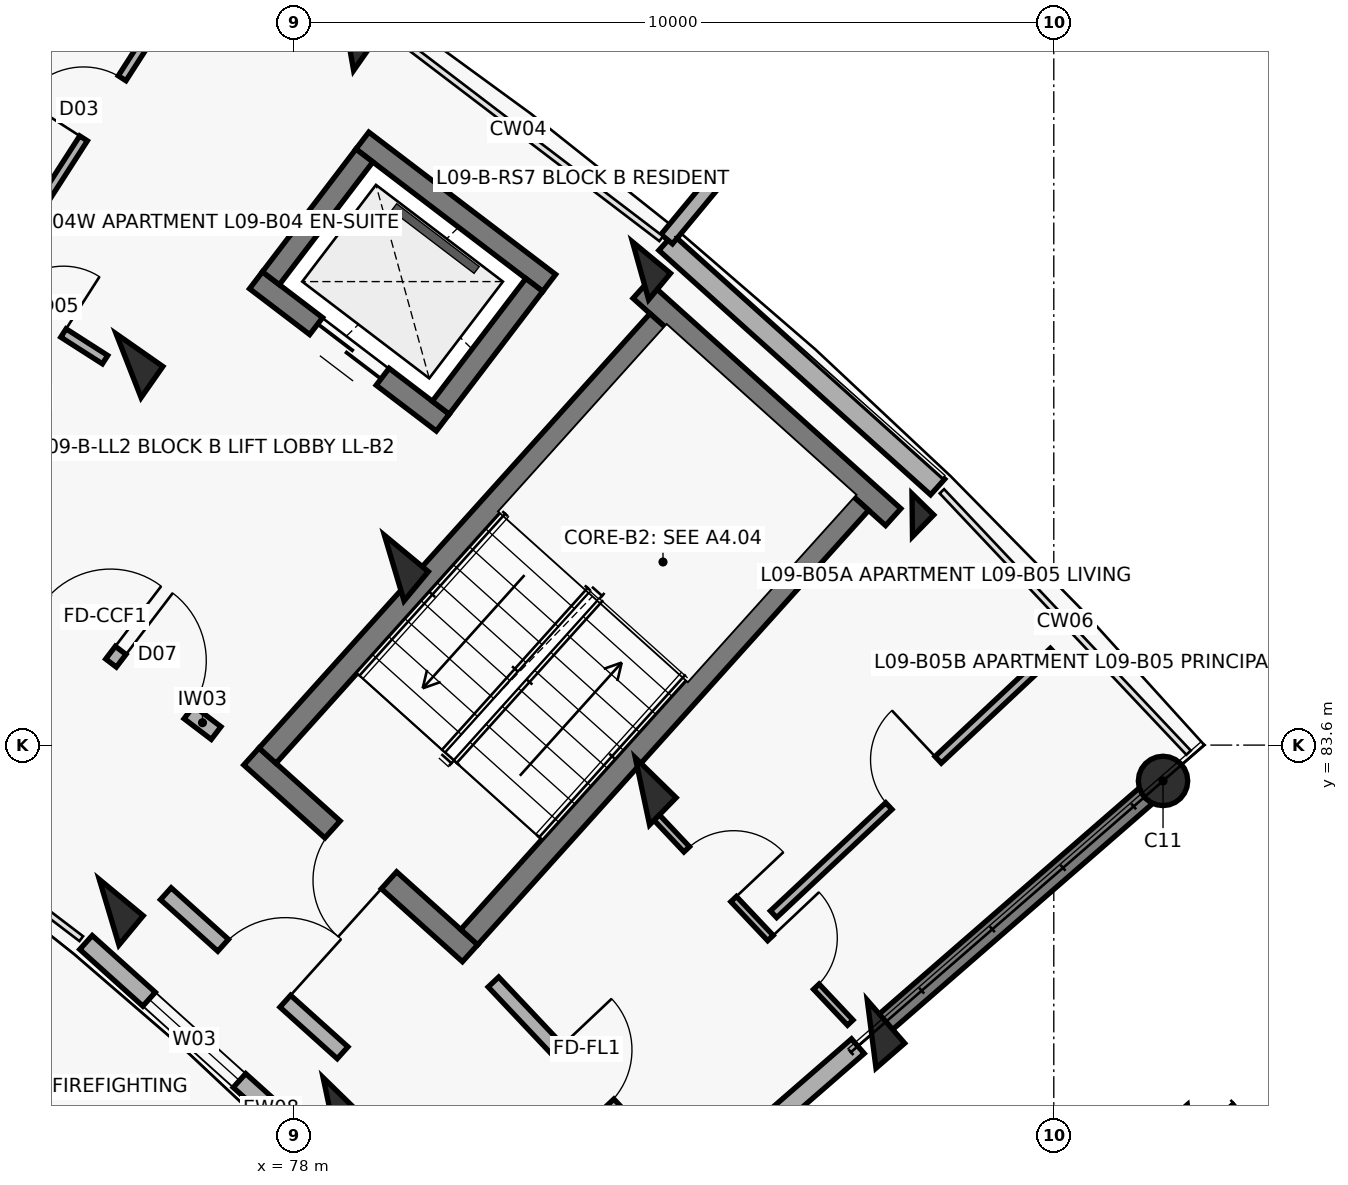
"""IFC4 building model, lengths in metres.
Left out: names, types, materials, properties, quantities, classifications, styles, units other than length and angle.
Written with IfcOpenShell. Run it as: python <this file> out.ifc"""

import sys

from ifc_helpers import new_model, si_unit, direction, frame, frame_2d, origin, origin_2d, place, context, subcontext, project, spatial, rectangle, circle, extrude, element, fill, save


model = new_model("IFC4")
c1 = context("Model", 3, precision=1e-05, world=origin(), true_north=direction((0.0, 1.0)))
c2 = subcontext(c1, "Body", "Model", "MODEL_VIEW")
j1 = project(units=[si_unit("LENGTHUNIT", "METRE"), si_unit("PLANEANGLEUNIT", "RADIAN")], contexts=[c1])
p1 = place(None, origin())
s1 = spatial("IfcSite", under=j1, at=p1, CompositionType="ELEMENT")
p2 = place(p1, origin())
s2 = spatial("IfcBuilding", under=s1, at=p2, CompositionType="ELEMENT")
p3 = place(p2, frame((0.0, 0.0, 29.8)))
s3 = spatial("IfcBuildingStorey", under=s2, at=p3, CompositionType="ELEMENT", Elevation=29.8)
p4 = place(p3, frame((75.828, 88.592, 0.0), z_axis=(0.0, 0.0, 1.0), x_axis=(0.573004420611, 0.819552276527, 0.0)))
e1 = element("IfcColumn", 1, at=p4, inside=s3, PredefinedType="COLUMN", context=c2, shape_type="SweptSolid", body=[
    extrude(rectangle(XDim=0.5, YDim=0.75, at=origin_2d()), origin(), (0.0, 0.0, 1.0), 3.1),
])
p5 = place(p3, frame((78.739, 92.755, 0.0), z_axis=(0.0, 0.0, 1.0), x_axis=(0.573004420611, 0.819552276527, 0.0)))
e2 = element("IfcColumn", 2, at=p5, inside=s3, PredefinedType="COLUMN", context=c2, shape_type="SweptSolid", body=[
    extrude(rectangle(XDim=0.4, YDim=0.4, at=origin_2d()), origin(), (0.0, 0.0, 1.0), 3.1),
])
for number, where, z_axis, x_axis in (
    (3, (75.571, 81.402, 0.0), (0.0, 0.0, 1.0), (0.638, 0.77, 0.0)),
    (4, (79.322, 85.93, 0.0), (0.0, 0.0, 1.0), (0.638, 0.77, 0.0)),
):
    element("IfcColumn", number, at=place(p3, frame(where, z_axis=z_axis, x_axis=x_axis)), inside=s3, PredefinedType="COLUMN", context=c2, shape_type="SweptSolid", body=[
        extrude(rectangle(XDim=0.5, YDim=0.75, at=origin_2d()), origin(), (0.0, 0.0, 1.0), 3.1),
    ])
p6 = place(p3, frame((82.563, 89.842, 0.0), z_axis=(0.0, 0.0, 1.0), x_axis=(0.637961754089, 0.770068049148, 0.0)))
e5 = element("IfcColumn", 5, at=p6, inside=s3, PredefinedType="COLUMN", context=c2, shape_type="SweptSolid", body=[
    extrude(rectangle(XDim=0.45, YDim=0.65, at=origin_2d()), origin(), (0.0, 0.0, 1.0), 3.1),
])
for number, where, z_axis, x_axis in (
    (6, (78.48, 78.784, 0.0), (0.0, 0.0, 1.0), (0.699, 0.715, 0.0)),
    (7, (82.588, 82.991, 0.0), (0.0, 0.0, 1.0), (0.699, 0.715, 0.0)),
):
    element("IfcColumn", number, at=place(p3, frame(where, z_axis=z_axis, x_axis=x_axis)), inside=s3, PredefinedType="COLUMN", context=c2, shape_type="SweptSolid", body=[
        extrude(rectangle(XDim=0.5, YDim=0.75, at=origin_2d()), origin(), (0.0, 0.0, 1.0), 3.1),
    ])
p7 = place(p3, frame((86.137, 86.626, 0.0), z_axis=(0.0, 0.0, 1.0), x_axis=(0.698665066769, 0.715448897181, 0.0)))
e8 = element("IfcColumn", 8, at=p7, inside=s3, PredefinedType="COLUMN", context=c2, shape_type="SweptSolid", body=[
    extrude(rectangle(XDim=0.4, YDim=0.4, at=origin_2d()), origin(), (0.0, 0.0, 1.0), 3.1),
])
p8 = place(p3, frame((85.603, 79.796, 0.0), z_axis=(0.0, 0.0, 1.0), x_axis=(0.754709580223, 0.656059028991, 0.0)))
e9 = element("IfcColumn", 9, at=p8, inside=s3, PredefinedType="COLUMN", context=c2, shape_type="SweptSolid", body=[
    extrude(rectangle(XDim=0.5, YDim=0.75, at=origin_2d()), origin(), (0.0, 0.0, 1.0), 3.1),
])
p9 = place(p3, frame((89.437, 83.129, 0.0), z_axis=(0.0, 0.0, 1.0), x_axis=(0.754709580223, 0.656059028991, 0.0)))
e10 = element("IfcColumn", 10, at=p9, inside=s3, PredefinedType="COLUMN", context=c2, shape_type="SweptSolid", body=[
    extrude(circle(Radius=0.325, at=origin_2d()), origin(), (0.0, 0.0, 1.0), 3.1),
])
p10 = place(p3, frame((85.739, 79.914, 0.0), z_axis=(0.0, 0.0, 1.0), x_axis=(0.754703505217, 0.65606601742, 0.0)))
e11 = element("IfcWall", 11, at=p10, inside=s3, PredefinedType="SHEAR", context=c2, shape_type="SweptSolid", body=[
    extrude(rectangle(XDim=4.72, YDim=0.27, at=frame_2d((2.36, 0.0))), origin(), (0.0, 0.0, 1.0), 2.86),
])
p11 = place(p3, frame((89.814, 78.422, 0.0), z_axis=(0.0, 0.0, 1.0), x_axis=(-0.754709580223, -0.656059028991, 0.0)))
e12 = element("IfcColumn", 12, at=p11, inside=s3, PredefinedType="COLUMN", context=c2, shape_type="SweptSolid", body=[
    extrude(rectangle(XDim=0.5, YDim=0.75, at=origin_2d()), origin(), (0.0, 0.0, 1.0), 3.1),
])
p12 = place(p3, frame((82.897, 90.213, 0.0), z_axis=(0.0, 0.0, 1.0), x_axis=(0.743387539862, -0.668860946369, 0.0)))
e13 = element("IfcWall", 13, at=p12, inside=s3, PredefinedType="SOLIDWALL", context=c2, shape_type="SweptSolid", body=[
    extrude(rectangle(XDim=4.809, YDim=0.278, at=frame_2d((2.405, 0.0))), origin(), (0.0, 0.0, 1.0), 2.25),
])
p13 = place(p3, frame((82.908, 90.257, 0.0), z_axis=(0.0, 0.0, 1.0), x_axis=(0.637967316825, 0.770063440674, 0.0)))
e14 = element("IfcWall", 14, at=p13, inside=s3, PredefinedType="PARAPET", context=c2, shape_type="SweptSolid", body=[
    extrude(rectangle(XDim=0.9, YDim=0.195, at=frame_2d((0.45, 0.0))), origin(), (0.0, 0.0, 1.0), 2.25),
])
p14 = place(p3, frame((75.267, 81.003, 0.0), z_axis=(0.0, 0.0, 1.0), x_axis=(0.743363835609, -0.668887290886, 0.0)))
e15 = element("IfcWall", 15, at=p14, inside=s3, PredefinedType="SOLIDWALL", context=c2, shape_type="SweptSolid", body=[
    extrude(rectangle(XDim=3.832, YDim=0.245, at=frame_2d((1.916, 0.0))), origin(), (0.0, 0.0, 1.0), 2.25),
])
p15 = place(p14, frame((1.116, 0.0, 0.32)))
e16 = element("IfcOpeningElement", 16, at=p15, cuts=e15, PredefinedType="OPENING", context=c2, shape_type="SweptSolid", body=[
    extrude(rectangle(XDim=1.6, YDim=1.5, at=frame_2d((0.8, 0.75))), frame((0.0, 0.133, 0.0), z_axis=(0.0, -1.0, 0.0), x_axis=(1.0, 0.0, 0.0)), (0.0, 0.0, 1.0), 0.265),
])
p16 = place(p3, frame((81.347, 76.096, 0.0), z_axis=(0.0, 0.0, 1.0), x_axis=(0.754709658894, 0.65605893849, 0.0)))
e17 = element("IfcWall", 17, at=p16, inside=s3, PredefinedType="SOLIDWALL", context=c2, shape_type="SweptSolid", body=[
    extrude(rectangle(XDim=5.4, YDim=0.255, at=frame_2d((2.7, 0.0))), origin(), (0.0, 0.0, 1.0), 2.18),
])
p17 = place(p16, frame((0.79, 0.0, 0.75)))
e18 = element("IfcOpeningElement", 18, at=p17, cuts=e17, PredefinedType="OPENING", context=c2, shape_type="SweptSolid", body=[
    extrude(rectangle(XDim=1.35, YDim=1.35, at=frame_2d((0.675, 0.675))), frame((0.0, 0.137, 0.0), z_axis=(0.0, -1.0, 0.0), x_axis=(1.0, 0.0, 0.0)), (0.0, 0.0, 1.0), 0.275),
])
p18 = place(p3, frame((71.979, 79.915, 0.0), z_axis=(0.0, 0.0, 1.0), x_axis=(0.729564048979, -0.68391249326, 0.0)))
e19 = element("IfcWall", 19, at=p18, inside=s3, PredefinedType="PARAPET", context=c2, shape_type="SweptSolid", body=[
    extrude(rectangle(XDim=9.075, YDim=0.18, at=frame_2d((4.538, 0.0))), origin(), (0.0, 0.0, 1.0), 0.25),
])
p19 = place(p3, frame((80.32, 80.862, 0.0), z_axis=(0.0, 0.0, 1.0), x_axis=(-0.743375696158, 0.668874109501, 0.0)))
e20 = element("IfcWall", 20, at=p19, inside=s3, PredefinedType="SHEAR", context=c2, shape_type="SweptSolid", body=[
    extrude(rectangle(XDim=3.87, YDim=0.3, at=frame_2d((1.935, 0.0))), origin(), (0.0, 0.0, 1.0), 3.1),
])
p20 = place(p19, frame((1.435, 0.0, 0.0)))
e21 = element("IfcOpeningElement", 21, at=p20, cuts=e20, PredefinedType="OPENING", context=c2, shape_type="SweptSolid", body=[
    extrude(rectangle(XDim=1.0, YDim=2.15, at=frame_2d((0.5, 1.075))), frame((0.0, 0.16, 0.0), z_axis=(0.0, -1.0, 0.0), x_axis=(1.0, 0.0, 0.0)), (0.0, 0.0, 1.0), 0.32),
])
p21 = place(p3, frame((85.887, 86.601, 0.0), z_axis=(0.0, 0.0, 1.0), x_axis=(-0.743400052815, 0.668847038922, 0.0)))
e22 = element("IfcWall", 22, at=p21, inside=s3, PredefinedType="SHEAR", context=c2, shape_type="SweptSolid", body=[
    extrude(rectangle(XDim=4.47, YDim=0.3, at=frame_2d((2.235, 0.0))), origin(), (0.0, 0.0, 1.0), 3.1),
])
p22 = place(p3, frame((80.309, 81.073, 0.0), z_axis=(0.0, 0.0, 1.0), x_axis=(0.668885797871, 0.743365179038, 0.0)))
e23 = element("IfcWall", 23, at=p22, inside=s3, PredefinedType="SHEAR", context=c2, shape_type="SweptSolid", body=[
    extrude(rectangle(XDim=7.69, YDim=0.3, at=frame_2d((3.845, 0.0))), origin(), (0.0, 0.0, 1.0), 3.1),
])
p23 = place(p3, frame((77.655, 83.461, 0.0), z_axis=(0.0, 0.0, 1.0), x_axis=(0.668868253964, 0.743380964808, 0.0)))
e24 = element("IfcWall", 24, at=p23, inside=s3, PredefinedType="SHEAR", context=c2, shape_type="SweptSolid", body=[
    extrude(rectangle(XDim=7.69, YDim=0.3, at=frame_2d((3.845, 0.0))), origin(), (0.0, 0.0, 1.0), 3.1),
])
p24 = place(p3, frame((79.961, 87.844, 0.0), z_axis=(0.0, 0.0, 1.0), x_axis=(-0.795464365424, 0.606000365793, 0.0)))
e25 = element("IfcWall", 25, at=p24, inside=s3, PredefinedType="SHEAR", context=c2, shape_type="SweptSolid", body=[
    extrude(rectangle(XDim=3.09, YDim=0.28, at=frame_2d((1.545, 0.0))), origin(), (0.0, 0.0, 1.0), 3.1),
])
p25 = place(p24, frame((0.995, 0.0, 0.0)))
e26 = element("IfcOpeningElement", 26, at=p25, cuts=e25, PredefinedType="OPENING", context=c2, shape_type="SweptSolid", body=[
    extrude(rectangle(XDim=1.1, YDim=2.15, at=frame_2d((0.55, 1.075))), frame((0.0, 0.15, 0.0), z_axis=(0.0, -1.0, 0.0), x_axis=(1.0, 0.0, 0.0)), (0.0, 0.0, 1.0), 0.3),
])
p26 = place(p3, frame((81.361, 89.681, 0.0), z_axis=(0.0, 0.0, 1.0), x_axis=(-0.795502452183, 0.605950368076, 0.0)))
e27 = element("IfcWall", 27, at=p26, inside=s3, PredefinedType="SHEAR", context=c2, shape_type="SweptSolid", body=[
    extrude(rectangle(XDim=3.09, YDim=0.28, at=frame_2d((1.545, 0.0))), origin(), (0.0, 0.0, 1.0), 3.1),
])
for number, where, z_axis, x_axis in (
    (28, (79.935, 88.04, 0.0), (0.0, 0.0, 1.0), (0.606, 0.795, 0.0)),
    (29, (77.699, 89.743, 0.0), (0.0, 0.0, 1.0), (0.606, 0.795, 0.0)),
):
    element("IfcWall", number, at=place(p3, frame(where, z_axis=z_axis, x_axis=x_axis)), inside=s3, PredefinedType="SHEAR", context=c2, shape_type="SweptSolid", body=[
        extrude(rectangle(XDim=2.03, YDim=0.28, at=frame_2d((1.015, 0.0))), origin(), (0.0, 0.0, 1.0), 3.1),
    ])
p27 = place(p3, frame((72.33, 90.712, 0.0), z_axis=(0.0, 0.0, 1.0), x_axis=(0.842245628842, -0.539093962771, 0.0)))
e30 = element("IfcWall", 30, at=p27, inside=s3, PredefinedType="PARTITIONING", context=c2, shape_type="SweptSolid", body=[
    extrude(rectangle(XDim=3.785, YDim=0.13, at=frame_2d((1.893, 0.0))), origin(), (0.0, 0.0, 1.0), 2.08),
])
p28 = place(p27, frame((0.65, 0.0, 0.0)))
e31 = element("IfcOpeningElement", 31, at=p28, cuts=e30, PredefinedType="OPENING", context=c2, shape_type="SweptSolid", body=[
    extrude(rectangle(XDim=0.9, YDim=2.1, at=frame_2d((0.45, 1.05))), frame((0.0, 0.075, 0.0), z_axis=(0.0, -1.0, 0.0), x_axis=(1.0, 0.0, 0.0)), (0.0, 0.0, 1.0), 0.15),
])
p29 = place(p27, frame((2.255, 0.0, 0.0)))
e32 = element("IfcOpeningElement", 32, at=p29, cuts=e30, PredefinedType="OPENING", context=c2, shape_type="SweptSolid", body=[
    extrude(rectangle(XDim=0.88, YDim=2.1, at=frame_2d((0.44, 1.05))), frame((0.0, 0.075, 0.0), z_axis=(0.0, -1.0, 0.0), x_axis=(1.0, 0.0, 0.0)), (0.0, 0.0, 1.0), 0.15),
])
p30 = place(p3, frame((74.124, 89.854, 0.0), z_axis=(0.0, 0.0, 1.0), x_axis=(0.5403494769, 0.84144069477, 0.0)))
e33 = element("IfcWall", 33, at=p30, inside=s3, PredefinedType="PARTITIONING", context=c2, shape_type="SweptSolid", body=[
    extrude(rectangle(XDim=5.05, YDim=0.12, at=frame_2d((2.525, 0.0))), origin(), (0.0, 0.0, 1.0), 2.08),
])
p31 = place(p30, frame((2.055, 0.0, 0.0)))
e34 = element("IfcOpeningElement", 34, at=p31, cuts=e33, PredefinedType="OPENING", context=c2, shape_type="SweptSolid", body=[
    extrude(rectangle(XDim=0.94, YDim=2.1, at=frame_2d((0.47, 1.05))), frame((0.0, 0.07, 0.0), z_axis=(0.0, -1.0, 0.0), x_axis=(1.0, 0.0, 0.0)), (0.0, 0.0, 1.0), 0.14),
])
p32 = place(p3, frame((74.357, 85.756, 0.0), z_axis=(0.0, 0.0, 1.0), x_axis=(0.795498026433, -0.605956178235, 0.0)))
e35 = element("IfcWall", 35, at=p32, inside=s3, PredefinedType="SOLIDWALL", context=c2, shape_type="SweptSolid", body=[
    extrude(rectangle(XDim=3.296, YDim=0.21, at=frame_2d((1.648, 0.0))), origin(), (0.0, 0.0, 1.0), 2.08),
])
p33 = place(p32, frame((0.45, 0.0, 0.0)))
e36 = element("IfcOpeningElement", 36, at=p33, cuts=e35, PredefinedType="OPENING", context=c2, shape_type="SweptSolid", body=[
    extrude(rectangle(XDim=1.1, YDim=2.15, at=frame_2d((0.55, 1.075))), frame((0.0, 0.115, 0.0), z_axis=(0.0, -1.0, 0.0), x_axis=(1.0, 0.0, 0.0)), (0.0, 0.0, 1.0), 0.23),
])
p34 = place(p32, frame((1.726, 0.0, 0.0)))
e37 = element("IfcOpeningElement", 37, at=p34, cuts=e35, PredefinedType="OPENING", context=c2, shape_type="SweptSolid", body=[
    extrude(rectangle(XDim=1.12, YDim=2.15, at=frame_2d((0.56, 1.075))), frame((0.0, 0.115, 0.0), z_axis=(0.0, -1.0, 0.0), x_axis=(1.0, 0.0, 0.0)), (0.0, 0.0, 1.0), 0.23),
])
p35 = place(p3, frame((76.317, 81.644, 0.0), z_axis=(0.0, 0.0, 1.0), x_axis=(0.743387266925, -0.668861249718, 0.0)))
e38 = element("IfcWall", 38, at=p35, inside=s3, PredefinedType="SOLIDWALL", context=c2, shape_type="SweptSolid", body=[
    extrude(rectangle(XDim=3.128, YDim=0.21, at=frame_2d((1.564, 0.0))), origin(), (0.0, 0.0, 1.0), 2.08),
])
p36 = place(p35, frame((1.014, 0.0, 0.0)))
e39 = element("IfcOpeningElement", 39, at=p36, cuts=e38, PredefinedType="OPENING", context=c2, shape_type="SweptSolid", body=[
    extrude(rectangle(XDim=1.1, YDim=2.15, at=frame_2d((0.55, 1.075))), frame((0.0, 0.115, 0.0), z_axis=(0.0, -1.0, 0.0), x_axis=(1.0, 0.0, 0.0)), (0.0, 0.0, 1.0), 0.23),
])
p37 = place(p3, frame((80.628, 80.483, 0.0), z_axis=(0.0, 0.0, 1.0), x_axis=(0.686310507227, -0.727308660522, 0.0)))
e40 = element("IfcWall", 40, at=p37, inside=s3, PredefinedType="SOLIDWALL", context=c2, shape_type="SweptSolid", body=[
    extrude(rectangle(XDim=3.436, YDim=0.19, at=frame_2d((1.718, 0.0))), origin(), (0.0, 0.0, 1.0), 2.08),
])
p38 = place(p37, frame((1.228, 0.0, 0.0)))
e41 = element("IfcOpeningElement", 41, at=p38, cuts=e40, PredefinedType="OPENING", context=c2, shape_type="SweptSolid", body=[
    extrude(rectangle(XDim=0.98, YDim=2.15, at=frame_2d((0.49, 1.075))), frame((0.0, 0.105, 0.0), z_axis=(0.0, -1.0, 0.0), x_axis=(1.0, 0.0, 0.0)), (0.0, 0.0, 1.0), 0.21),
])
p39 = place(p3, frame((82.724, 82.701, 0.0), z_axis=(0.0, 0.0, 1.0), x_axis=(0.686331812627, -0.72728855551, 0.0)))
e42 = element("IfcWall", 42, at=p39, inside=s3, PredefinedType="PARTITIONING", context=c2, shape_type="SweptSolid", body=[
    extrude(rectangle(XDim=3.785, YDim=0.1, at=frame_2d((1.893, 0.0))), origin(), (0.0, 0.0, 1.0), 2.08),
])
p40 = place(p39, frame((0.65, 0.0, 0.0)))
e43 = element("IfcOpeningElement", 43, at=p40, cuts=e42, PredefinedType="OPENING", context=c2, shape_type="SweptSolid", body=[
    extrude(rectangle(XDim=0.9, YDim=2.1, at=frame_2d((0.45, 1.05))), frame((0.0, 0.06, 0.0), z_axis=(0.0, -1.0, 0.0), x_axis=(1.0, 0.0, 0.0)), (0.0, 0.0, 1.0), 0.12),
])
p41 = place(p39, frame((2.255, 0.0, 0.0)))
e44 = element("IfcOpeningElement", 44, at=p41, cuts=e42, PredefinedType="OPENING", context=c2, shape_type="SweptSolid", body=[
    extrude(rectangle(XDim=0.88, YDim=2.1, at=frame_2d((0.44, 1.05))), frame((0.0, 0.06, 0.0), z_axis=(0.0, -1.0, 0.0), x_axis=(1.0, 0.0, 0.0)), (0.0, 0.0, 1.0), 0.12),
])
p42 = place(p3, frame((84.312, 81.375, 0.0), z_axis=(0.0, 0.0, 1.0), x_axis=(0.72936983679, 0.684119610288, 0.0)))
e45 = element("IfcWall", 45, at=p42, inside=s3, PredefinedType="PARTITIONING", context=c2, shape_type="SweptSolid", body=[
    extrude(rectangle(XDim=5.05, YDim=0.12, at=frame_2d((2.525, 0.0))), origin(), (0.0, 0.0, 1.0), 2.08),
])
p43 = place(p42, frame((2.08, 0.0, 0.0)))
e46 = element("IfcOpeningElement", 46, at=p43, cuts=e45, PredefinedType="OPENING", context=c2, shape_type="SweptSolid", body=[
    extrude(rectangle(XDim=0.89, YDim=2.1, at=frame_2d((0.445, 1.05))), frame((0.0, 0.07, 0.0), z_axis=(0.0, -1.0, 0.0), x_axis=(1.0, 0.0, 0.0)), (0.0, 0.0, 1.0), 0.14),
])
p44 = place(p15, origin())
e47 = element("IfcWindow", 47, at=p44, inside=s3, PartitioningType="DOUBLE_PANEL_VERTICAL", PredefinedType="WINDOW", context=c2, shape_type="SweptSolid", body=[
    extrude(rectangle(XDim=1.6, YDim=1.5, at=frame_2d((0.8, 0.75))), frame((0.0, 0.03, 0.0), z_axis=(0.0, -1.0, 0.0), x_axis=(1.0, 0.0, 0.0)), (0.0, 0.0, 1.0), 0.06),
])
fill(e16, e47)
p45 = place(p20, origin())
e48 = element("IfcDoor", 48, at=p45, inside=s3, OperationType="SINGLE_SWING_LEFT", PredefinedType="DOOR", context=c2, shape_type="SweptSolid", body=[
    extrude(rectangle(XDim=1.0, YDim=2.15, at=frame_2d((0.5, 1.075))), frame((0.0, 0.025, 0.0), z_axis=(0.0, -1.0, 0.0), x_axis=(1.0, 0.0, 0.0)), (0.0, 0.0, 1.0), 0.05),
])
fill(e21, e48)
p46 = place(p25, origin())
e49 = element("IfcDoor", 49, at=p46, inside=s3, OperationType="DOUBLE_DOOR_SLIDING", PredefinedType="DOOR", context=c2, shape_type="SweptSolid", body=[
    extrude(rectangle(XDim=1.1, YDim=2.15, at=frame_2d((0.55, 1.075))), frame((0.0, 0.025, 0.0), z_axis=(0.0, -1.0, 0.0), x_axis=(1.0, 0.0, 0.0)), (0.0, 0.0, 1.0), 0.05),
])
fill(e26, e49)
p47 = place(p29, origin())
e50 = element("IfcDoor", 50, at=p47, inside=s3, OperationType="SINGLE_SWING_RIGHT", PredefinedType="DOOR", context=c2, shape_type="SweptSolid", body=[
    extrude(rectangle(XDim=0.88, YDim=2.1, at=frame_2d((0.44, 1.05))), frame((0.0, 0.025, 0.0), z_axis=(0.0, -1.0, 0.0), x_axis=(1.0, 0.0, 0.0)), (0.0, 0.0, 1.0), 0.05),
])
fill(e32, e50)
p48 = place(p31, origin())
e51 = element("IfcDoor", 51, at=p48, inside=s3, OperationType="SINGLE_SWING_LEFT", PredefinedType="DOOR", context=c2, shape_type="SweptSolid", body=[
    extrude(rectangle(XDim=0.94, YDim=2.1, at=frame_2d((0.47, 1.05))), frame((0.0, 0.025, 0.0), z_axis=(0.0, -1.0, 0.0), x_axis=(1.0, 0.0, 0.0)), (0.0, 0.0, 1.0), 0.05),
])
fill(e34, e51)
p49 = place(p33, origin())
e52 = element("IfcDoor", 52, at=p49, inside=s3, OperationType="SINGLE_SWING_RIGHT", PredefinedType="DOOR", context=c2, shape_type="SweptSolid", body=[
    extrude(rectangle(XDim=1.1, YDim=2.15, at=frame_2d((0.55, 1.075))), frame((0.0, 0.025, 0.0), z_axis=(0.0, -1.0, 0.0), x_axis=(1.0, 0.0, 0.0)), (0.0, 0.0, 1.0), 0.05),
])
fill(e36, e52)
p50 = place(p34, origin())
e53 = element("IfcDoor", 53, at=p50, inside=s3, OperationType="SINGLE_SWING_LEFT", PredefinedType="DOOR", context=c2, shape_type="SweptSolid", body=[
    extrude(rectangle(XDim=1.12, YDim=2.15, at=frame_2d((0.56, 1.075))), frame((0.0, 0.025, 0.0), z_axis=(0.0, -1.0, 0.0), x_axis=(1.0, 0.0, 0.0)), (0.0, 0.0, 1.0), 0.05),
])
fill(e37, e53)
p51 = place(p36, origin())
e54 = element("IfcDoor", 54, at=p51, inside=s3, OperationType="SINGLE_SWING_RIGHT", PredefinedType="DOOR", context=c2, shape_type="SweptSolid", body=[
    extrude(rectangle(XDim=1.1, YDim=2.15, at=frame_2d((0.55, 1.075))), frame((0.0, 0.025, 0.0), z_axis=(0.0, -1.0, 0.0), x_axis=(1.0, 0.0, 0.0)), (0.0, 0.0, 1.0), 0.05),
])
fill(e39, e54)
p52 = place(p38, origin())
e55 = element("IfcDoor", 55, at=p52, inside=s3, OperationType="SINGLE_SWING_LEFT", PredefinedType="DOOR", context=c2, shape_type="SweptSolid", body=[
    extrude(rectangle(XDim=0.98, YDim=2.15, at=frame_2d((0.49, 1.075))), frame((0.0, 0.025, 0.0), z_axis=(0.0, -1.0, 0.0), x_axis=(1.0, 0.0, 0.0)), (0.0, 0.0, 1.0), 0.05),
])
fill(e41, e55)
p53 = place(p40, origin())
e56 = element("IfcDoor", 56, at=p53, inside=s3, OperationType="SINGLE_SWING_RIGHT", PredefinedType="DOOR", context=c2, shape_type="SweptSolid", body=[
    extrude(rectangle(XDim=0.9, YDim=2.1, at=frame_2d((0.45, 1.05))), frame((0.0, 0.025, 0.0), z_axis=(0.0, -1.0, 0.0), x_axis=(1.0, 0.0, 0.0)), (0.0, 0.0, 1.0), 0.05),
])
fill(e43, e56)
p54 = place(p41, origin())
e57 = element("IfcDoor", 57, at=p54, inside=s3, OperationType="SINGLE_SWING_LEFT", PredefinedType="DOOR", context=c2, shape_type="SweptSolid", body=[
    extrude(rectangle(XDim=0.88, YDim=2.1, at=frame_2d((0.44, 1.05))), frame((0.0, 0.025, 0.0), z_axis=(0.0, -1.0, 0.0), x_axis=(1.0, 0.0, 0.0)), (0.0, 0.0, 1.0), 0.05),
])
fill(e44, e57)
p55 = place(p43, origin())
e58 = element("IfcDoor", 58, at=p55, inside=s3, OperationType="SINGLE_SWING_RIGHT", PredefinedType="DOOR", context=c2, shape_type="SweptSolid", body=[
    extrude(rectangle(XDim=0.89, YDim=2.1, at=frame_2d((0.445, 1.05))), frame((0.0, 0.025, 0.0), z_axis=(0.0, -1.0, 0.0), x_axis=(1.0, 0.0, 0.0)), (0.0, 0.0, 1.0), 0.05),
])
fill(e46, e58)
save(model, sys.argv[1])
